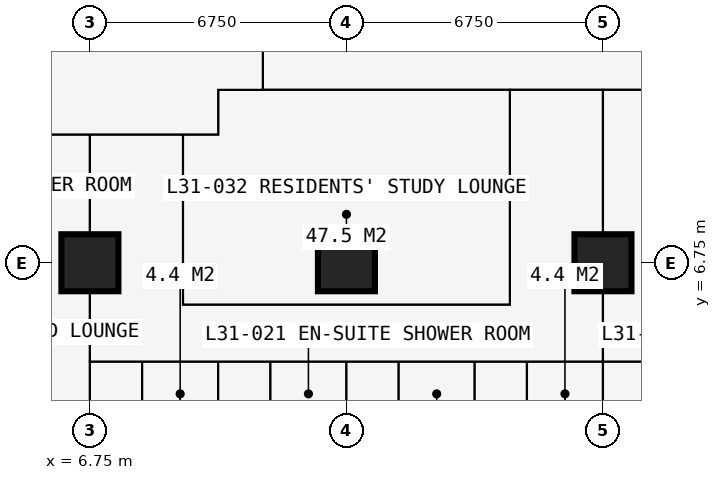
"""IFC4 building model, lengths in metres.
Left out: names, types, materials, properties, quantities, classifications, styles, units other than length and angle.
Written with IfcOpenShell. Run it as: python <this file> out.ifc"""

import sys

from ifc_helpers import new_model, si_unit, direction, frame, frame_2d, origin, origin_2d, place, context, subcontext, project, spatial, rectangle, extrude, element, fill, save


model = new_model("IFC4")
c1 = context("Model", 3, precision=1e-05, world=origin(), true_north=direction((0.0, 1.0)))
c2 = subcontext(c1, "Body", "Model", "MODEL_VIEW")
j1 = project(units=[si_unit("LENGTHUNIT", "METRE"), si_unit("PLANEANGLEUNIT", "RADIAN")], contexts=[c1])
p1 = place(None, origin())
s1 = spatial("IfcSite", under=j1, at=p1, CompositionType="ELEMENT")
p2 = place(p1, origin())
s2 = spatial("IfcBuilding", under=s1, at=p2, CompositionType="ELEMENT")
p3 = place(p2, frame((0.0, 0.0, 116.1)))
s3 = spatial("IfcBuildingStorey", under=s2, at=p3, CompositionType="ELEMENT", Elevation=116.1)
for number, where, z_axis, x_axis in (
    (1, (6.75, 6.75, 0.0), (0.0, 0.0, 1.0), (1.0, 0.0, 0.0)),
    (2, (13.5, 6.75, 0.0), (0.0, 0.0, 1.0), (1.0, 0.0, 0.0)),
    (3, (20.25, 6.75, 0.0), (0.0, 0.0, 1.0), (1.0, 0.0, 0.0)),
):
    element("IfcColumn", number, at=place(p3, frame(where, z_axis=z_axis, x_axis=x_axis)), inside=s3, PredefinedType="COLUMN", context=c2, shape_type="SweptSolid", body=[
        extrude(rectangle(XDim=1.5, YDim=1.5, at=origin_2d()), origin(), (0.0, 0.0, 1.0), 3.6),
    ])
p4 = place(p3, frame((-0.734, 10.125, 0.0), z_axis=(0.0, 0.0, 1.0), x_axis=(1.0, 0.0, 0.0)))
e4 = element("IfcWall", 4, at=p4, inside=s3, PredefinedType="PARTITIONING", context=c2, shape_type="SweptSolid", body=[
    extrude(rectangle(XDim=10.859, YDim=0.15, at=frame_2d((5.429, 0.0))), origin(), (0.0, 0.0, 1.0), 3.375),
])
p5 = place(p4, frame((5.134, 0.0, 0.0)))
e5 = element("IfcOpeningElement", 5, at=p5, cuts=e4, PredefinedType="OPENING", context=c2, shape_type="SweptSolid", body=[
    extrude(rectangle(XDim=1.0, YDim=2.2, at=frame_2d((0.5, 1.1))), frame((0.0, 0.085, 0.0), z_axis=(0.0, -1.0, 0.0), x_axis=(1.0, 0.0, 0.0)), (0.0, 0.0, 1.0), 0.17),
])
p6 = place(p3, frame((6.75, -0.734, 0.0), z_axis=(0.0, 0.0, 1.0), x_axis=(0.0, 1.0, 0.0)))
e6 = element("IfcWall", 6, at=p6, inside=s3, PredefinedType="PARTITIONING", context=c2, shape_type="SweptSolid", body=[
    extrude(rectangle(XDim=10.859, YDim=0.15, at=frame_2d((5.429, 0.0))), origin(), (0.0, 0.0, 1.0), 2.877),
])
p7 = place(p3, frame((6.75, 4.15, 0.0), z_axis=(0.0, 0.0, 1.0), x_axis=(1.0, 0.0, 0.0)))
e7 = element("IfcWall", 7, at=p7, inside=s3, PredefinedType="PARTITIONING", context=c2, shape_type="SweptSolid", body=[
    extrude(rectangle(XDim=23.625, YDim=0.1, at=frame_2d((11.812, 0.0))), origin(), (0.0, 0.0, 1.0), 3.375),
])
p8 = place(p7, frame((0.2, 0.0, 0.0)))
e8 = element("IfcOpeningElement", 8, at=p8, cuts=e7, PredefinedType="OPENING", context=c2, shape_type="SweptSolid", body=[
    extrude(rectangle(XDim=0.95, YDim=2.2, at=frame_2d((0.475, 1.1))), frame((0.0, 0.06, 0.0), z_axis=(0.0, -1.0, 0.0), x_axis=(1.0, 0.0, 0.0)), (0.0, 0.0, 1.0), 0.12),
])
p9 = place(p7, frame((3.625, 0.0, 0.0)))
e9 = element("IfcOpeningElement", 9, at=p9, cuts=e7, PredefinedType="OPENING", context=c2, shape_type="SweptSolid", body=[
    extrude(rectangle(XDim=0.95, YDim=2.2, at=frame_2d((0.475, 1.1))), frame((0.0, 0.06, 0.0), z_axis=(0.0, -1.0, 0.0), x_axis=(1.0, 0.0, 0.0)), (0.0, 0.0, 1.0), 0.12),
])
p10 = place(p7, frame((7.0, 0.0, 0.0)))
e10 = element("IfcOpeningElement", 10, at=p10, cuts=e7, PredefinedType="OPENING", context=c2, shape_type="SweptSolid", body=[
    extrude(rectangle(XDim=0.95, YDim=2.2, at=frame_2d((0.475, 1.1))), frame((0.0, 0.06, 0.0), z_axis=(0.0, -1.0, 0.0), x_axis=(1.0, 0.0, 0.0)), (0.0, 0.0, 1.0), 0.12),
])
p11 = place(p7, frame((10.375, 0.0, 0.0)))
e11 = element("IfcOpeningElement", 11, at=p11, cuts=e7, PredefinedType="OPENING", context=c2, shape_type="SweptSolid", body=[
    extrude(rectangle(XDim=0.95, YDim=2.2, at=frame_2d((0.475, 1.1))), frame((0.0, 0.06, 0.0), z_axis=(0.0, -1.0, 0.0), x_axis=(1.0, 0.0, 0.0)), (0.0, 0.0, 1.0), 0.12),
])
p12 = place(p7, frame((18.475, 0.0, 0.0)))
e12 = element("IfcOpeningElement", 12, at=p12, cuts=e7, PredefinedType="OPENING", context=c2, shape_type="SweptSolid", body=[
    extrude(rectangle(XDim=0.95, YDim=2.2, at=frame_2d((0.475, 1.1))), frame((0.0, 0.06, 0.0), z_axis=(0.0, -1.0, 0.0), x_axis=(1.0, 0.0, 0.0)), (0.0, 0.0, 1.0), 0.12),
])
p13 = place(p7, frame((13.7, 0.0, 0.0)))
e13 = element("IfcOpeningElement", 13, at=p13, cuts=e7, PredefinedType="OPENING", context=c2, shape_type="SweptSolid", body=[
    extrude(rectangle(XDim=0.95, YDim=2.2, at=frame_2d((0.475, 1.1))), frame((0.0, 0.06, 0.0), z_axis=(0.0, -1.0, 0.0), x_axis=(1.0, 0.0, 0.0)), (0.0, 0.0, 1.0), 0.12),
])
p14 = place(p3, frame((8.125, 1.95, 0.0), z_axis=(0.0, 0.0, 1.0), x_axis=(0.0, 1.0, 0.0)))
e14 = element("IfcWall", 14, at=p14, inside=s3, PredefinedType="PARTITIONING", context=c2, shape_type="SweptSolid", body=[
    extrude(rectangle(XDim=2.2, YDim=0.1, at=frame_2d((1.1, 0.0))), origin(), (0.0, 0.0, 1.0), 3.375),
])
p15 = place(p14, frame((0.65, 0.0, 0.0)))
e15 = element("IfcOpeningElement", 15, at=p15, cuts=e14, PredefinedType="OPENING", context=c2, shape_type="SweptSolid", body=[
    extrude(rectangle(XDim=0.9, YDim=2.2, at=frame_2d((0.45, 1.1))), frame((0.0, 0.06, 0.0), z_axis=(0.0, -1.0, 0.0), x_axis=(1.0, 0.0, 0.0)), (0.0, 0.0, 1.0), 0.12),
])
p16 = place(p3, frame((9.2, 5.65, 0.0), z_axis=(0.0, 0.0, 1.0), x_axis=(0.0, 1.0, 0.0)))
e16 = element("IfcWall", 16, at=p16, inside=s3, PredefinedType="PARTITIONING", context=c2, shape_type="SweptSolid", body=[
    extrude(rectangle(XDim=4.475, YDim=0.15, at=frame_2d((2.238, 0.0))), origin(), (0.0, 0.0, 1.0), 3.375),
])
p17 = place(p3, frame((9.2, 5.65, 0.0), z_axis=(0.0, 0.0, 1.0), x_axis=(1.0, 0.0, 0.0)))
e17 = element("IfcWall", 17, at=p17, inside=s3, PredefinedType="PARTITIONING", context=c2, shape_type="SweptSolid", body=[
    extrude(rectangle(XDim=8.6, YDim=0.15, at=frame_2d((4.3, 0.0))), origin(), (0.0, 0.0, 1.0), 3.375),
])
p18 = place(p3, frame((10.125, -0.734, 0.0), z_axis=(0.0, 0.0, 1.0), x_axis=(0.0, 1.0, 0.0)))
e18 = element("IfcWall", 18, at=p18, inside=s3, PredefinedType="PARTITIONING", context=c2, shape_type="SweptSolid", body=[
    extrude(rectangle(XDim=4.884, YDim=0.175, at=frame_2d((2.442, 0.0))), origin(), (0.0, 0.0, 1.0), 3.375),
])
p19 = place(p3, frame((10.125, 10.125, 0.0), z_axis=(0.0, 0.0, 1.0), x_axis=(0.0, 1.0, 0.0)))
e19 = element("IfcWall", 19, at=p19, inside=s3, PredefinedType="PARTITIONING", context=c2, shape_type="SweptSolid", body=[
    extrude(rectangle(XDim=1.175, YDim=0.15, at=frame_2d((0.587, 0.0))), origin(), (0.0, 0.0, 1.0), 3.375),
])
p20 = place(p3, frame((10.125, 11.3, 0.0), z_axis=(0.0, 0.0, 1.0), x_axis=(1.0, 0.0, 0.0)))
e20 = element("IfcWall", 20, at=p20, inside=s3, PredefinedType="PARTITIONING", context=c2, shape_type="SweptSolid", body=[
    extrude(rectangle(XDim=20.675, YDim=0.15, at=frame_2d((10.337, 0.0))), origin(), (0.0, 0.0, 1.0), 3.375),
])
p21 = place(p20, frame((8.375, 0.0, 0.0)))
e21 = element("IfcOpeningElement", 21, at=p21, cuts=e20, PredefinedType="OPENING", context=c2, shape_type="SweptSolid", body=[
    extrude(rectangle(XDim=1.0, YDim=2.2, at=frame_2d((0.5, 1.1))), frame((0.0, 0.085, 0.0), z_axis=(0.0, -1.0, 0.0), x_axis=(1.0, 0.0, 0.0)), (0.0, 0.0, 1.0), 0.17),
])
p22 = place(p20, frame((10.975, 0.0, 0.0)))
e22 = element("IfcOpeningElement", 22, at=p22, cuts=e20, PredefinedType="OPENING", context=c2, shape_type="SweptSolid", body=[
    extrude(rectangle(XDim=1.0, YDim=2.2, at=frame_2d((0.5, 1.1))), frame((0.0, 0.085, 0.0), z_axis=(0.0, -1.0, 0.0), x_axis=(1.0, 0.0, 0.0)), (0.0, 0.0, 1.0), 0.17),
])
p23 = place(p20, frame((3.925, 0.0, 0.0)))
e23 = element("IfcOpeningElement", 23, at=p23, cuts=e20, PredefinedType="OPENING", context=c2, shape_type="SweptSolid", body=[
    extrude(rectangle(XDim=0.95, YDim=2.2, at=frame_2d((0.475, 1.1))), frame((0.0, 0.085, 0.0), z_axis=(0.0, -1.0, 0.0), x_axis=(1.0, 0.0, 0.0)), (0.0, 0.0, 1.0), 0.17),
])
p24 = place(p3, frame((11.3, 11.3, 0.0), z_axis=(0.0, 0.0, 1.0), x_axis=(0.0, 1.0, 0.0)))
e24 = element("IfcWall", 24, at=p24, inside=s3, PredefinedType="PARTITIONING", context=c2, shape_type="SweptSolid", body=[
    extrude(rectangle(XDim=19.3, YDim=0.15, at=frame_2d((9.65, 0.0))), origin(), (0.0, 0.0, 1.0), 3.375),
])
p25 = place(p24, frame((13.525, 0.0, 0.0)))
e25 = element("IfcOpeningElement", 25, at=p25, cuts=e24, PredefinedType="OPENING", context=c2, shape_type="SweptSolid", body=[
    extrude(rectangle(XDim=1.0, YDim=2.2, at=frame_2d((0.5, 1.1))), frame((0.0, 0.085, 0.0), z_axis=(0.0, -1.0, 0.0), x_axis=(1.0, 0.0, 0.0)), (0.0, 0.0, 1.0), 0.17),
])
p26 = place(p24, frame((10.438, 0.0, 0.0)))
e26 = element("IfcOpeningElement", 26, at=p26, cuts=e24, PredefinedType="OPENING", context=c2, shape_type="SweptSolid", body=[
    extrude(rectangle(XDim=1.0, YDim=2.2, at=frame_2d((0.5, 1.1))), frame((0.0, 0.085, 0.0), z_axis=(0.0, -1.0, 0.0), x_axis=(1.0, 0.0, 0.0)), (0.0, 0.0, 1.0), 0.17),
])
p27 = place(p3, frame((11.5, 1.95, 0.0), z_axis=(0.0, 0.0, 1.0), x_axis=(0.0, 1.0, 0.0)))
e27 = element("IfcWall", 27, at=p27, inside=s3, PredefinedType="PARTITIONING", context=c2, shape_type="SweptSolid", body=[
    extrude(rectangle(XDim=2.2, YDim=0.1, at=frame_2d((1.1, 0.0))), origin(), (0.0, 0.0, 1.0), 3.375),
])
p28 = place(p27, frame((0.65, 0.0, 0.0)))
e28 = element("IfcOpeningElement", 28, at=p28, cuts=e27, PredefinedType="OPENING", context=c2, shape_type="SweptSolid", body=[
    extrude(rectangle(XDim=0.9, YDim=2.2, at=frame_2d((0.45, 1.1))), frame((0.0, 0.06, 0.0), z_axis=(0.0, -1.0, 0.0), x_axis=(1.0, 0.0, 0.0)), (0.0, 0.0, 1.0), 0.12),
])
p29 = place(p3, frame((13.5, -0.734, 0.0), z_axis=(0.0, 0.0, 1.0), x_axis=(0.0, 1.0, 0.0)))
e29 = element("IfcWall", 29, at=p29, inside=s3, PredefinedType="PARTITIONING", context=c2, shape_type="SweptSolid", body=[
    extrude(rectangle(XDim=4.884, YDim=0.175, at=frame_2d((2.442, 0.0))), origin(), (0.0, 0.0, 1.0), 2.877),
])
p30 = place(p3, frame((14.875, 1.95, 0.0), z_axis=(0.0, 0.0, 1.0), x_axis=(0.0, 1.0, 0.0)))
e30 = element("IfcWall", 30, at=p30, inside=s3, PredefinedType="PARTITIONING", context=c2, shape_type="SweptSolid", body=[
    extrude(rectangle(XDim=2.2, YDim=0.1, at=frame_2d((1.1, 0.0))), origin(), (0.0, 0.0, 1.0), 3.375),
])
p31 = place(p30, frame((0.65, 0.0, 0.0)))
e31 = element("IfcOpeningElement", 31, at=p31, cuts=e30, PredefinedType="OPENING", context=c2, shape_type="SweptSolid", body=[
    extrude(rectangle(XDim=0.9, YDim=2.2, at=frame_2d((0.45, 1.1))), frame((0.0, 0.06, 0.0), z_axis=(0.0, -1.0, 0.0), x_axis=(1.0, 0.0, 0.0)), (0.0, 0.0, 1.0), 0.12),
])
p32 = place(p3, frame((16.875, -0.734, 0.0), z_axis=(0.0, 0.0, 1.0), x_axis=(0.0, 1.0, 0.0)))
e32 = element("IfcWall", 32, at=p32, inside=s3, PredefinedType="PARTITIONING", context=c2, shape_type="SweptSolid", body=[
    extrude(rectangle(XDim=4.884, YDim=0.175, at=frame_2d((2.442, 0.0))), origin(), (0.0, 0.0, 1.0), 3.375),
])
p33 = place(p3, frame((17.8, 5.65, 0.0), z_axis=(0.0, 0.0, 1.0), x_axis=(0.0, 1.0, 0.0)))
e33 = element("IfcWall", 33, at=p33, inside=s3, PredefinedType="PARTITIONING", context=c2, shape_type="SweptSolid", body=[
    extrude(rectangle(XDim=5.65, YDim=0.15, at=frame_2d((2.825, 0.0))), origin(), (0.0, 0.0, 1.0), 3.375),
])
p34 = place(p3, frame((18.25, 1.95, 0.0), z_axis=(0.0, 0.0, 1.0), x_axis=(0.0, 1.0, 0.0)))
e34 = element("IfcWall", 34, at=p34, inside=s3, PredefinedType="PARTITIONING", context=c2, shape_type="SweptSolid", body=[
    extrude(rectangle(XDim=2.2, YDim=0.1, at=frame_2d((1.1, 0.0))), origin(), (0.0, 0.0, 1.0), 3.375),
])
p35 = place(p34, frame((0.65, 0.0, 0.0)))
e35 = element("IfcOpeningElement", 35, at=p35, cuts=e34, PredefinedType="OPENING", context=c2, shape_type="SweptSolid", body=[
    extrude(rectangle(XDim=0.9, YDim=2.2, at=frame_2d((0.45, 1.1))), frame((0.0, 0.06, 0.0), z_axis=(0.0, -1.0, 0.0), x_axis=(1.0, 0.0, 0.0)), (0.0, 0.0, 1.0), 0.12),
])
p36 = place(p3, frame((20.25, -0.734, 0.0), z_axis=(0.0, 0.0, 1.0), x_axis=(0.0, 1.0, 0.0)))
e36 = element("IfcWall", 36, at=p36, inside=s3, PredefinedType="PARTITIONING", context=c2, shape_type="SweptSolid", body=[
    extrude(rectangle(XDim=12.034, YDim=0.15, at=frame_2d((6.017, 0.0))), origin(), (0.0, 0.0, 1.0), 2.61),
])
p37 = place(p8, origin())
e37 = element("IfcDoor", 37, at=p37, inside=s3, OperationType="SINGLE_SWING_LEFT", PredefinedType="DOOR", context=c2, shape_type="SweptSolid", body=[
    extrude(rectangle(XDim=0.95, YDim=2.2, at=frame_2d((0.475, 1.1))), frame((0.0, 0.025, 0.0), z_axis=(0.0, -1.0, 0.0), x_axis=(1.0, 0.0, 0.0)), (0.0, 0.0, 1.0), 0.05),
])
fill(e8, e37)
p38 = place(p15, origin())
e38 = element("IfcDoor", 38, at=p38, inside=s3, OperationType="SINGLE_SWING_RIGHT", PredefinedType="DOOR", context=c2, shape_type="SweptSolid", body=[
    extrude(rectangle(XDim=0.9, YDim=2.2, at=frame_2d((0.45, 1.1))), frame((0.0, 0.025, 0.0), z_axis=(0.0, -1.0, 0.0), x_axis=(1.0, 0.0, 0.0)), (0.0, 0.0, 1.0), 0.05),
])
fill(e15, e38)
p39 = place(p9, origin())
e39 = element("IfcDoor", 39, at=p39, inside=s3, OperationType="SINGLE_SWING_LEFT", PredefinedType="DOOR", context=c2, shape_type="SweptSolid", body=[
    extrude(rectangle(XDim=0.95, YDim=2.2, at=frame_2d((0.475, 1.1))), frame((0.0, 0.025, 0.0), z_axis=(0.0, -1.0, 0.0), x_axis=(1.0, 0.0, 0.0)), (0.0, 0.0, 1.0), 0.05),
])
fill(e9, e39)
p40 = place(p28, origin())
e40 = element("IfcDoor", 40, at=p40, inside=s3, OperationType="SINGLE_SWING_RIGHT", PredefinedType="DOOR", context=c2, shape_type="SweptSolid", body=[
    extrude(rectangle(XDim=0.9, YDim=2.2, at=frame_2d((0.45, 1.1))), frame((0.0, 0.025, 0.0), z_axis=(0.0, -1.0, 0.0), x_axis=(1.0, 0.0, 0.0)), (0.0, 0.0, 1.0), 0.05),
])
fill(e28, e40)
p41 = place(p10, origin())
e41 = element("IfcDoor", 41, at=p41, inside=s3, OperationType="SINGLE_SWING_LEFT", PredefinedType="DOOR", context=c2, shape_type="SweptSolid", body=[
    extrude(rectangle(XDim=0.95, YDim=2.2, at=frame_2d((0.475, 1.1))), frame((0.0, 0.025, 0.0), z_axis=(0.0, -1.0, 0.0), x_axis=(1.0, 0.0, 0.0)), (0.0, 0.0, 1.0), 0.05),
])
fill(e10, e41)
p42 = place(p31, origin())
e42 = element("IfcDoor", 42, at=p42, inside=s3, OperationType="SINGLE_SWING_RIGHT", PredefinedType="DOOR", context=c2, shape_type="SweptSolid", body=[
    extrude(rectangle(XDim=0.9, YDim=2.2, at=frame_2d((0.45, 1.1))), frame((0.0, 0.025, 0.0), z_axis=(0.0, -1.0, 0.0), x_axis=(1.0, 0.0, 0.0)), (0.0, 0.0, 1.0), 0.05),
])
fill(e31, e42)
p43 = place(p11, origin())
e43 = element("IfcDoor", 43, at=p43, inside=s3, OperationType="SINGLE_SWING_LEFT", PredefinedType="DOOR", context=c2, shape_type="SweptSolid", body=[
    extrude(rectangle(XDim=0.95, YDim=2.2, at=frame_2d((0.475, 1.1))), frame((0.0, 0.025, 0.0), z_axis=(0.0, -1.0, 0.0), x_axis=(1.0, 0.0, 0.0)), (0.0, 0.0, 1.0), 0.05),
])
fill(e11, e43)
p44 = place(p35, origin())
e44 = element("IfcDoor", 44, at=p44, inside=s3, OperationType="SINGLE_SWING_RIGHT", PredefinedType="DOOR", context=c2, shape_type="SweptSolid", body=[
    extrude(rectangle(XDim=0.9, YDim=2.2, at=frame_2d((0.45, 1.1))), frame((0.0, 0.025, 0.0), z_axis=(0.0, -1.0, 0.0), x_axis=(1.0, 0.0, 0.0)), (0.0, 0.0, 1.0), 0.05),
])
fill(e35, e44)
p45 = place(p21, origin())
e45 = element("IfcDoor", 45, at=p45, inside=s3, OperationType="SINGLE_SWING_LEFT", PredefinedType="DOOR", context=c2, shape_type="SweptSolid", body=[
    extrude(rectangle(XDim=1.0, YDim=2.2, at=frame_2d((0.5, 1.1))), frame((0.0, 0.025, 0.0), z_axis=(0.0, -1.0, 0.0), x_axis=(1.0, 0.0, 0.0)), (0.0, 0.0, 1.0), 0.05),
])
fill(e21, e45)
p46 = place(p13, origin())
e46 = element("IfcDoor", 46, at=p46, inside=s3, OperationType="SINGLE_SWING_LEFT", PredefinedType="DOOR", context=c2, shape_type="SweptSolid", body=[
    extrude(rectangle(XDim=0.95, YDim=2.2, at=frame_2d((0.475, 1.1))), frame((0.0, 0.025, 0.0), z_axis=(0.0, -1.0, 0.0), x_axis=(1.0, 0.0, 0.0)), (0.0, 0.0, 1.0), 0.05),
])
fill(e13, e46)
p47 = place(p22, origin())
e47 = element("IfcDoor", 47, at=p47, inside=s3, OperationType="SINGLE_SWING_LEFT", PredefinedType="DOOR", context=c2, shape_type="SweptSolid", body=[
    extrude(rectangle(XDim=1.0, YDim=2.2, at=frame_2d((0.5, 1.1))), frame((0.0, 0.025, 0.0), z_axis=(0.0, -1.0, 0.0), x_axis=(1.0, 0.0, 0.0)), (0.0, 0.0, 1.0), 0.05),
])
fill(e22, e47)
p48 = place(p23, origin())
e48 = element("IfcDoor", 48, at=p48, inside=s3, OperationType="SINGLE_SWING_LEFT", PredefinedType="DOOR", context=c2, shape_type="SweptSolid", body=[
    extrude(rectangle(XDim=0.95, YDim=2.2, at=frame_2d((0.475, 1.1))), frame((0.0, 0.025, 0.0), z_axis=(0.0, -1.0, 0.0), x_axis=(1.0, 0.0, 0.0)), (0.0, 0.0, 1.0), 0.05),
])
fill(e23, e48)
save(model, sys.argv[1])
